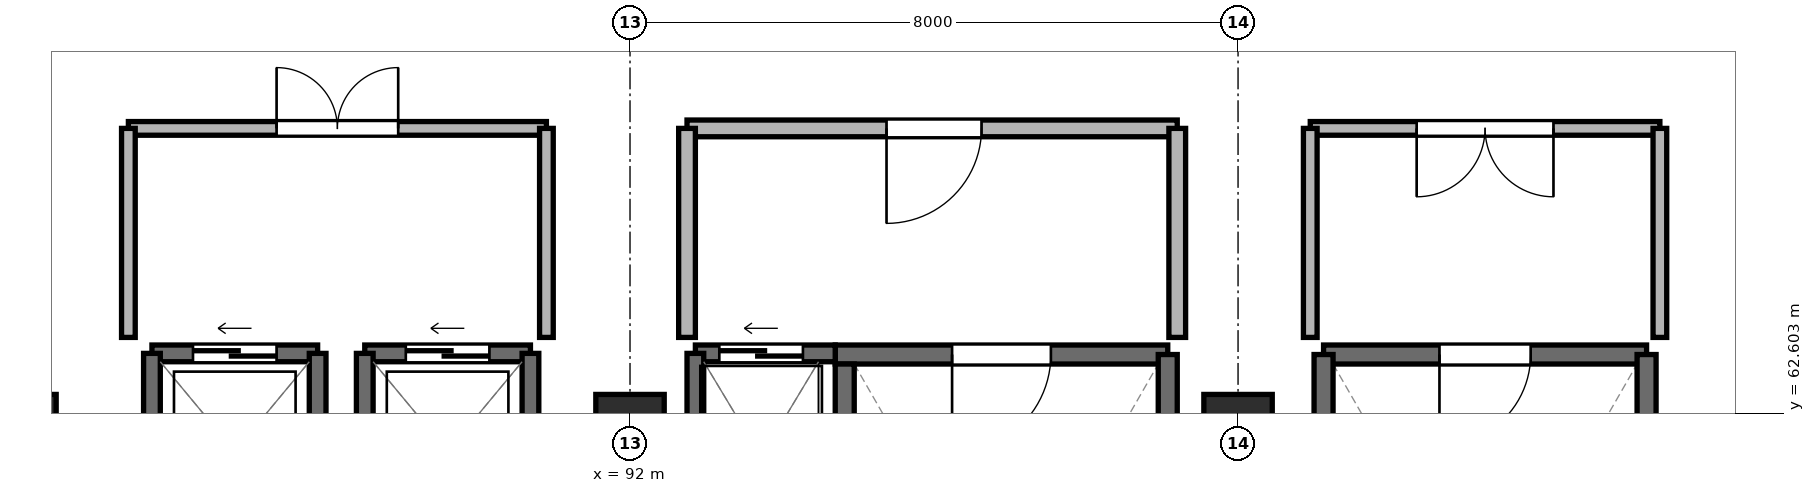
"""IFC4 building model, lengths in metres.
Left out: names, types, materials, properties, quantities, classifications, styles, units other than length and angle.
Written with IfcOpenShell. Run it as: python <this file> out.ifc"""

import sys

from ifc_helpers import new_model, si_unit, direction, frame, frame_2d, origin, origin_2d, place, context, subcontext, project, spatial, rectangle, extrude, element, fill, save


model = new_model("IFC4")
c1 = context("Model", 3, precision=1e-05, world=origin(), true_north=direction((0.0, 1.0)))
c2 = subcontext(c1, "Body", "Model", "MODEL_VIEW")
j1 = project(units=[si_unit("LENGTHUNIT", "METRE"), si_unit("PLANEANGLEUNIT", "RADIAN")], contexts=[c1])
p1 = place(None, origin())
s1 = spatial("IfcSite", under=j1, at=p1, CompositionType="ELEMENT")
p2 = place(p1, origin())
s2 = spatial("IfcBuilding", under=s1, at=p2, CompositionType="ELEMENT")
p3 = place(p2, frame((0.0, 0.0, 27.55)))
s3 = spatial("IfcBuildingStorey", under=s2, at=p3, CompositionType="ELEMENT", Elevation=27.55)
for number, where, z_axis, x_axis in (
    (1, (84.0, 62.4, -0.26), (0.0, 0.0, 1.0), (1.0, 0.0, 0.0)),
    (2, (92.0, 62.4, -0.26), (0.0, 0.0, 1.0), (1.0, 0.0, 0.0)),
    (3, (100.0, 62.4, -0.26), (0.0, 0.0, 1.0), (1.0, 0.0, 0.0)),
):
    element("IfcColumn", number, at=place(p3, frame(where, z_axis=z_axis, x_axis=x_axis)), inside=s3, PredefinedType="COLUMN", context=c2, shape_type="SweptSolid", body=[
        extrude(rectangle(XDim=0.9, YDim=0.9, at=origin_2d()), origin(), (0.0, 0.0, 1.0), 3.25),
    ])
p4 = place(p3, frame((99.075, 63.375, 0.0), z_axis=(0.0, 0.0, 1.0), x_axis=(-1.0, 0.0, 0.0)))
e4 = element("IfcWall", 4, at=p4, inside=s3, PredefinedType="SHEAR", context=c2, shape_type="SweptSolid", body=[
    extrude(rectangle(XDim=4.375, YDim=0.25, at=frame_2d((2.188, 0.0))), origin(), (0.0, 0.0, 1.0), 2.99),
])
p5 = place(p4, frame((1.538, 0.0, 0.0)))
e5 = element("IfcOpeningElement", 5, at=p5, cuts=e4, PredefinedType="OPENING", context=c2, shape_type="SweptSolid", body=[
    extrude(rectangle(XDim=1.3, YDim=2.2, at=frame_2d((0.65, 1.1))), frame((0.0, 0.137, 0.0), z_axis=(0.0, -1.0, 0.0), x_axis=(1.0, 0.0, 0.0)), (0.0, 0.0, 1.0), 0.274),
])
p6 = place(p3, frame((94.825, 63.25, 0.0), z_axis=(0.0, 0.0, 1.0), x_axis=(0.0, -1.0, 0.0)))
e6 = element("IfcWall", 6, at=p6, inside=s3, PredefinedType="SHEAR", context=c2, shape_type="SweptSolid", body=[
    extrude(rectangle(XDim=7.075, YDim=0.25, at=frame_2d((3.538, 0.0))), origin(), (0.0, 0.0, 1.0), 2.99),
])
p7 = place(p3, frame((99.075, 56.175, 0.0), z_axis=(0.0, 0.0, 1.0), x_axis=(0.0, 1.0, 0.0)))
e7 = element("IfcWall", 7, at=p7, inside=s3, PredefinedType="SHEAR", context=c2, shape_type="SweptSolid", body=[
    extrude(rectangle(XDim=7.2, YDim=0.25, at=frame_2d((3.6, 0.0))), origin(), (0.0, 0.0, 1.0), 2.99),
])
p8 = place(p3, frame((105.375, 63.375, 0.0), z_axis=(0.0, 0.0, 1.0), x_axis=(-1.0, 0.0, 0.0)))
e8 = element("IfcWall", 8, at=p8, inside=s3, PredefinedType="SHEAR", context=c2, shape_type="SweptSolid", body=[
    extrude(rectangle(XDim=4.25, YDim=0.25, at=frame_2d((2.125, 0.0))), origin(), (0.0, 0.0, 1.0), 2.99),
])
p9 = place(p8, frame((1.525, 0.0, 0.0)))
e9 = element("IfcOpeningElement", 9, at=p9, cuts=e8, PredefinedType="OPENING", context=c2, shape_type="SweptSolid", body=[
    extrude(rectangle(XDim=1.2, YDim=2.2, at=frame_2d((0.6, 1.1))), frame((0.0, 0.137, 0.0), z_axis=(0.0, -1.0, 0.0), x_axis=(1.0, 0.0, 0.0)), (0.0, 0.0, 1.0), 0.274),
])
for number, where, z_axis, x_axis in (
    (10, (101.125, 63.375, 0.0), (0.0, 0.0, 1.0), (0.0, -1.0, 0.0)),
    (11, (105.375, 56.175, 0.0), (0.0, 0.0, 1.0), (0.0, 1.0, 0.0)),
):
    element("IfcWall", number, at=place(p3, frame(where, z_axis=z_axis, x_axis=x_axis)), inside=s3, PredefinedType="SHEAR", context=c2, shape_type="SweptSolid", body=[
        extrude(rectangle(XDim=7.2, YDim=0.25, at=frame_2d((3.6, 0.0))), origin(), (0.0, 0.0, 1.0), 2.99),
    ])
p10 = place(p3, frame((94.7, 63.39, 0.0), z_axis=(0.0, 0.0, 1.0), x_axis=(-1.0, 0.0, 0.0)))
e12 = element("IfcWall", 12, at=p10, inside=s3, PredefinedType="SHEAR", context=c2, shape_type="SweptSolid", body=[
    extrude(rectangle(XDim=1.84, YDim=0.22, at=frame_2d((0.92, 0.0))), origin(), (0.0, 0.0, 1.0), 2.99),
])
p11 = place(p10, frame((0.425, 0.0, 0.0)))
e13 = element("IfcOpeningElement", 13, at=p11, cuts=e12, PredefinedType="OPENING", context=c2, shape_type="SweptSolid", body=[
    extrude(rectangle(XDim=1.1, YDim=2.2, at=frame_2d((0.55, 1.1))), frame((0.0, 0.122, 0.0), z_axis=(0.0, -1.0, 0.0), x_axis=(1.0, 0.0, 0.0)), (0.0, 0.0, 1.0), 0.244),
])
p12 = place(p3, frame((92.86, 63.39, 0.0), z_axis=(0.0, 0.0, 1.0), x_axis=(0.0, -1.0, 0.0)))
e14 = element("IfcWall", 14, at=p12, inside=s3, PredefinedType="SHEAR", context=c2, shape_type="SweptSolid", body=[
    extrude(rectangle(XDim=2.73, YDim=0.22, at=frame_2d((1.365, 0.0))), origin(), (0.0, 0.0, 1.0), 2.99),
])
p13 = place(p3, frame((87.89, 63.39, 0.0), z_axis=(0.0, 0.0, 1.0), x_axis=(-1.0, 0.0, 0.0)))
e15 = element("IfcWall", 15, at=p13, inside=s3, PredefinedType="SHEAR", context=c2, shape_type="SweptSolid", body=[
    extrude(rectangle(XDim=2.18, YDim=0.22, at=frame_2d((1.09, 0.0))), origin(), (0.0, 0.0, 1.0), 2.99),
])
p14 = place(p13, frame((0.54, 0.0, 0.0)))
e16 = element("IfcOpeningElement", 16, at=p14, cuts=e15, PredefinedType="OPENING", context=c2, shape_type="SweptSolid", body=[
    extrude(rectangle(XDim=1.1, YDim=2.2, at=frame_2d((0.55, 1.1))), frame((0.0, 0.122, 0.0), z_axis=(0.0, -1.0, 0.0), x_axis=(1.0, 0.0, 0.0)), (0.0, 0.0, 1.0), 0.244),
])
for number, where, z_axis, x_axis in (
    (17, (85.71, 63.39, 0.0), (0.0, 0.0, 1.0), (0.0, -1.0, 0.0)),
    (18, (87.89, 60.81, 0.0), (0.0, 0.0, 1.0), (0.0, 1.0, 0.0)),
):
    element("IfcWall", number, at=place(p3, frame(where, z_axis=z_axis, x_axis=x_axis)), inside=s3, PredefinedType="SHEAR", context=c2, shape_type="SweptSolid", body=[
        extrude(rectangle(XDim=2.58, YDim=0.22, at=frame_2d((1.29, 0.0))), origin(), (0.0, 0.0, 1.0), 2.99),
    ])
p15 = place(p3, frame((90.69, 63.39, 0.0), z_axis=(0.0, 0.0, 1.0), x_axis=(-1.0, 0.0, 0.0)))
e19 = element("IfcWall", 19, at=p15, inside=s3, PredefinedType="SHEAR", context=c2, shape_type="SweptSolid", body=[
    extrude(rectangle(XDim=2.18, YDim=0.22, at=frame_2d((1.09, 0.0))), origin(), (0.0, 0.0, 1.0), 2.99),
])
p16 = place(p15, frame((0.54, 0.0, 0.0)))
e20 = element("IfcOpeningElement", 20, at=p16, cuts=e19, PredefinedType="OPENING", context=c2, shape_type="SweptSolid", body=[
    extrude(rectangle(XDim=1.1, YDim=2.2, at=frame_2d((0.55, 1.1))), frame((0.0, 0.122, 0.0), z_axis=(0.0, -1.0, 0.0), x_axis=(1.0, 0.0, 0.0)), (0.0, 0.0, 1.0), 0.244),
])
for number, where, z_axis, x_axis in (
    (21, (88.51, 63.39, 0.0), (0.0, 0.0, 1.0), (0.0, -1.0, 0.0)),
    (22, (90.69, 60.81, 0.0), (0.0, 0.0, 1.0), (0.0, 1.0, 0.0)),
):
    element("IfcWall", number, at=place(p3, frame(where, z_axis=z_axis, x_axis=x_axis)), inside=s3, PredefinedType="SHEAR", context=c2, shape_type="SweptSolid", body=[
        extrude(rectangle(XDim=2.58, YDim=0.22, at=frame_2d((1.29, 0.0))), origin(), (0.0, 0.0, 1.0), 2.99),
    ])
p17 = place(p3, frame((92.75, 66.35, 0.0), z_axis=(0.0, 0.0, 1.0), x_axis=(1.0, 0.0, 0.0)))
e23 = element("IfcWall", 23, at=p17, inside=s3, PredefinedType="PARTITIONING", context=c2, shape_type="SweptSolid", body=[
    extrude(rectangle(XDim=6.45, YDim=0.22, at=frame_2d((3.225, 0.0))), origin(), (0.0, 0.0, 1.0), 2.53),
])
p18 = place(p17, frame((2.625, 0.0, 0.0)))
e24 = element("IfcOpeningElement", 24, at=p18, cuts=e23, PredefinedType="OPENING", context=c2, shape_type="SweptSolid", body=[
    extrude(rectangle(XDim=1.25, YDim=2.2, at=frame_2d((0.625, 1.1))), frame((0.0, 0.122, 0.0), z_axis=(0.0, -1.0, 0.0), x_axis=(1.0, 0.0, 0.0)), (0.0, 0.0, 1.0), 0.244),
])
for number, where, z_axis, x_axis in (
    (25, (92.75, 63.6, 0.0), (0.0, 0.0, 1.0), (0.0, 1.0, 0.0)),
    (26, (99.2, 63.6, 0.0), (0.0, 0.0, 1.0), (0.0, 1.0, 0.0)),
):
    element("IfcWall", number, at=place(p3, frame(where, z_axis=z_axis, x_axis=x_axis)), inside=s3, PredefinedType="PARTITIONING", context=c2, shape_type="SweptSolid", body=[
        extrude(rectangle(XDim=2.75, YDim=0.22, at=frame_2d((1.375, 0.0))), origin(), (0.0, 0.0, 1.0), 2.53),
    ])
p19 = place(p3, frame((85.4, 66.35, 0.0), z_axis=(0.0, 0.0, 1.0), x_axis=(1.0, 0.0, 0.0)))
e27 = element("IfcWall", 27, at=p19, inside=s3, PredefinedType="PARTITIONING", context=c2, shape_type="SweptSolid", body=[
    extrude(rectangle(XDim=5.5, YDim=0.18, at=frame_2d((2.75, 0.0))), origin(), (0.0, 0.0, 1.0), 2.53),
])
p20 = place(p19, frame((1.95, 0.0, 0.0)))
e28 = element("IfcOpeningElement", 28, at=p20, cuts=e27, PredefinedType="OPENING", context=c2, shape_type="SweptSolid", body=[
    extrude(rectangle(XDim=1.6, YDim=2.2, at=frame_2d((0.8, 1.1))), frame((0.0, 0.102, 0.0), z_axis=(0.0, -1.0, 0.0), x_axis=(1.0, 0.0, 0.0)), (0.0, 0.0, 1.0), 0.204),
])
for number, where, z_axis, x_axis in (
    (29, (85.4, 63.6, 0.0), (0.0, 0.0, 1.0), (0.0, 1.0, 0.0)),
    (30, (90.9, 63.6, 0.0), (0.0, 0.0, 1.0), (0.0, 1.0, 0.0)),
):
    element("IfcWall", number, at=place(p3, frame(where, z_axis=z_axis, x_axis=x_axis)), inside=s3, PredefinedType="PARTITIONING", context=c2, shape_type="SweptSolid", body=[
        extrude(rectangle(XDim=2.75, YDim=0.18, at=frame_2d((1.375, 0.0))), origin(), (0.0, 0.0, 1.0), 2.53),
    ])
p21 = place(p3, frame((100.95, 66.35, 0.0), z_axis=(0.0, 0.0, 1.0), x_axis=(1.0, 0.0, 0.0)))
e31 = element("IfcWall", 31, at=p21, inside=s3, PredefinedType="PARTITIONING", context=c2, shape_type="SweptSolid", body=[
    extrude(rectangle(XDim=4.6, YDim=0.18, at=frame_2d((2.3, 0.0))), origin(), (0.0, 0.0, 1.0), 2.53),
])
p22 = place(p21, frame((1.4, 0.0, 0.0)))
e32 = element("IfcOpeningElement", 32, at=p22, cuts=e31, PredefinedType="OPENING", context=c2, shape_type="SweptSolid", body=[
    extrude(rectangle(XDim=1.8, YDim=2.2, at=frame_2d((0.9, 1.1))), frame((0.0, 0.102, 0.0), z_axis=(0.0, -1.0, 0.0), x_axis=(1.0, 0.0, 0.0)), (0.0, 0.0, 1.0), 0.204),
])
for number, where, z_axis, x_axis in (
    (33, (100.95, 63.6, 0.0), (0.0, 0.0, 1.0), (0.0, 1.0, 0.0)),
    (34, (105.55, 63.6, 0.0), (0.0, 0.0, 1.0), (0.0, 1.0, 0.0)),
):
    element("IfcWall", number, at=place(p3, frame(where, z_axis=z_axis, x_axis=x_axis)), inside=s3, PredefinedType="PARTITIONING", context=c2, shape_type="SweptSolid", body=[
        extrude(rectangle(XDim=2.75, YDim=0.18, at=frame_2d((1.375, 0.0))), origin(), (0.0, 0.0, 1.0), 2.53),
    ])
p23 = place(p5, origin())
e35 = element("IfcDoor", 35, at=p23, inside=s3, OperationType="SINGLE_SWING_RIGHT", PredefinedType="DOOR", context=c2, shape_type="SweptSolid", body=[
    extrude(rectangle(XDim=1.3, YDim=2.2, at=frame_2d((0.65, 1.1))), frame((0.0, 0.025, 0.0), z_axis=(0.0, -1.0, 0.0), x_axis=(1.0, 0.0, 0.0)), (0.0, 0.0, 1.0), 0.05),
])
fill(e5, e35)
p24 = place(p9, origin())
e36 = element("IfcDoor", 36, at=p24, inside=s3, OperationType="SINGLE_SWING_RIGHT", PredefinedType="DOOR", context=c2, shape_type="SweptSolid", body=[
    extrude(rectangle(XDim=1.2, YDim=2.2, at=frame_2d((0.6, 1.1))), frame((0.0, 0.025, 0.0), z_axis=(0.0, -1.0, 0.0), x_axis=(1.0, 0.0, 0.0)), (0.0, 0.0, 1.0), 0.05),
])
fill(e9, e36)
p25 = place(p11, origin())
e37 = element("IfcDoor", 37, at=p25, inside=s3, OperationType="SLIDING_TO_RIGHT", PredefinedType="DOOR", context=c2, shape_type="SweptSolid", body=[
    extrude(rectangle(XDim=1.1, YDim=2.2, at=frame_2d((0.55, 1.1))), frame((0.0, 0.025, 0.0), z_axis=(0.0, -1.0, 0.0), x_axis=(1.0, 0.0, 0.0)), (0.0, 0.0, 1.0), 0.05),
])
fill(e13, e37)
p26 = place(p14, origin())
e38 = element("IfcDoor", 38, at=p26, inside=s3, OperationType="SLIDING_TO_RIGHT", PredefinedType="DOOR", context=c2, shape_type="SweptSolid", body=[
    extrude(rectangle(XDim=1.1, YDim=2.2, at=frame_2d((0.55, 1.1))), frame((0.0, 0.025, 0.0), z_axis=(0.0, -1.0, 0.0), x_axis=(1.0, 0.0, 0.0)), (0.0, 0.0, 1.0), 0.05),
])
fill(e16, e38)
p27 = place(p16, origin())
e39 = element("IfcDoor", 39, at=p27, inside=s3, OperationType="SLIDING_TO_RIGHT", PredefinedType="DOOR", context=c2, shape_type="SweptSolid", body=[
    extrude(rectangle(XDim=1.1, YDim=2.2, at=frame_2d((0.55, 1.1))), frame((0.0, 0.025, 0.0), z_axis=(0.0, -1.0, 0.0), x_axis=(1.0, 0.0, 0.0)), (0.0, 0.0, 1.0), 0.05),
])
fill(e20, e39)
p28 = place(p18, frame((1.25, 0.0, 0.0), z_axis=(0.0, 0.0, 1.0), x_axis=(-1.0, 0.0, 0.0)))
e40 = element("IfcDoor", 40, at=p28, inside=s3, OperationType="SINGLE_SWING_LEFT", PredefinedType="DOOR", context=c2, shape_type="SweptSolid", body=[
    extrude(rectangle(XDim=1.25, YDim=2.2, at=frame_2d((0.625, 1.1))), frame((0.0, 0.025, 0.0), z_axis=(0.0, -1.0, 0.0), x_axis=(1.0, 0.0, 0.0)), (0.0, 0.0, 1.0), 0.05),
])
fill(e24, e40)
p29 = place(p20, origin())
e41 = element("IfcDoor", 41, at=p29, inside=s3, OperationType="DOUBLE_DOOR_SINGLE_SWING", PredefinedType="DOOR", context=c2, shape_type="SweptSolid", body=[
    extrude(rectangle(XDim=1.6, YDim=2.2, at=frame_2d((0.8, 1.1))), frame((0.0, 0.025, 0.0), z_axis=(0.0, -1.0, 0.0), x_axis=(1.0, 0.0, 0.0)), (0.0, 0.0, 1.0), 0.05),
])
fill(e28, e41)
p30 = place(p22, frame((1.8, 0.0, 0.0), z_axis=(0.0, 0.0, 1.0), x_axis=(-1.0, 0.0, 0.0)))
e42 = element("IfcDoor", 42, at=p30, inside=s3, OperationType="DOUBLE_DOOR_SINGLE_SWING", PredefinedType="DOOR", context=c2, shape_type="SweptSolid", body=[
    extrude(rectangle(XDim=1.8, YDim=2.2, at=frame_2d((0.9, 1.1))), frame((0.0, 0.025, 0.0), z_axis=(0.0, -1.0, 0.0), x_axis=(1.0, 0.0, 0.0)), (0.0, 0.0, 1.0), 0.05),
])
fill(e32, e42)
save(model, sys.argv[1])
